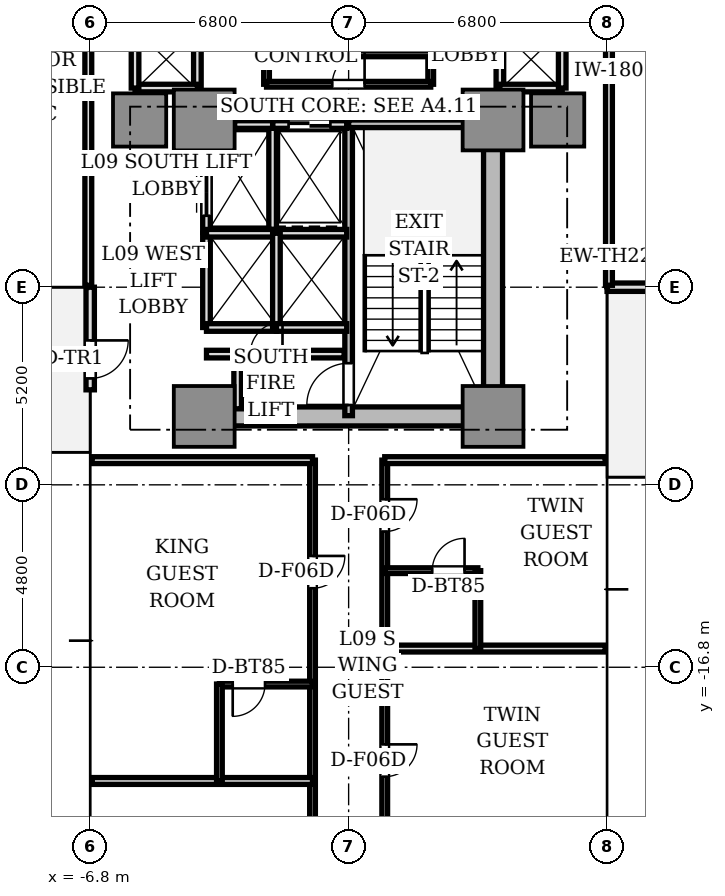
"""IFC4 building model, lengths in metres.
Left out: names, types, materials, properties, quantities, classifications, styles, units other than length and angle.
Written with IfcOpenShell. Run it as: python <this file> out.ifc"""

import sys

from ifc_helpers import new_model, si_unit, direction, frame, frame_2d, origin, origin_2d, place, context, subcontext, project, spatial, rectangle, extrude, source, transform, mapped, element, fill, save


model = new_model("IFC4")
c1 = context("Model", 3, precision=1e-05, world=origin(), true_north=direction((0.0, 1.0)))
c2 = subcontext(c1, "Body", "Model", "MODEL_VIEW")
j1 = project(units=[si_unit("LENGTHUNIT", "METRE"), si_unit("PLANEANGLEUNIT", "RADIAN")], contexts=[c1])
p1 = place(None, origin())
s1 = spatial("IfcSite", under=j1, at=p1, CompositionType="ELEMENT")
p2 = place(p1, origin())
s2 = spatial("IfcBuilding", under=s1, at=p2, CompositionType="ELEMENT")
p3 = place(p2, frame((0.0, 0.0, 36.5)))
s3 = spatial("IfcBuildingStorey", under=s2, at=p3, CompositionType="ELEMENT", Elevation=36.5)
p4 = place(p3, frame((-3.55, -10.2, 0.0), z_axis=(0.0, 0.0, 1.0), x_axis=(1.0, 0.0, 0.0)))
e1 = element("IfcWall", 1, at=p4, inside=s3, PredefinedType="SHEAR", context=c2, shape_type="SweptSolid", body=[
    extrude(rectangle(XDim=7.1, YDim=0.5, at=frame_2d((3.55, 0.0))), origin(), (0.0, 0.0, 1.0), 3.11),
])
p5 = place(p3, frame((3.8, -9.75, 0.0), z_axis=(0.0, 0.0, 1.0), x_axis=(0.0, 1.0, 0.0)))
e2 = element("IfcWall", 2, at=p5, inside=s3, PredefinedType="SHEAR", context=c2, shape_type="SweptSolid", body=[
    extrude(rectangle(XDim=6.9, YDim=0.5, at=frame_2d((3.45, 0.0))), origin(), (0.0, 0.0, 1.0), 3.11),
])
m1 = source(origin(), c2, "Body", "SweptSolid", [
    extrude(rectangle(XDim=1.6, YDim=1.6, at=origin_2d()), origin(), (0.0, 0.0, 1.0), 3.11),
])
for number, where, z_axis, x_axis in (
    (3, (-3.8, -2.4, 0.0), (0.0, 0.0, 1.0), (1.0, 0.0, 0.0)),
    (4, (3.8, -2.4, 0.0), (0.0, 0.0, 1.0), (1.0, 0.0, 0.0)),
    (5, (-3.8, -10.2, 0.0), (0.0, 0.0, 1.0), (1.0, 0.0, 0.0)),
    (6, (3.8, -10.2, 0.0), (0.0, 0.0, 1.0), (1.0, 0.0, 0.0)),
):
    element("IfcColumn", number, at=place(p3, frame(where, z_axis=z_axis, x_axis=x_axis)), inside=s3, PredefinedType="COLUMN", context=c2, shape_type="MappedRepresentation", body=[
        mapped(m1, transform((0.0, 0.0, 0.0), scale=1.0)),
    ])
m2 = source(origin(), c2, "Body", "SweptSolid", [
    extrude(rectangle(XDim=1.4, YDim=1.4, at=origin_2d()), origin(), (0.0, 0.0, 1.0), 3.11),
])
for number, where, z_axis, x_axis in (
    (7, (5.5, -2.4, 0.0), (0.0, 0.0, 1.0), (1.0, 0.0, 0.0)),
    (8, (-5.5, -2.4, 0.0), (0.0, 0.0, 1.0), (1.0, 0.0, 0.0)),
):
    element("IfcColumn", number, at=place(p3, frame(where, z_axis=z_axis, x_axis=x_axis)), inside=s3, PredefinedType="COLUMN", context=c2, shape_type="MappedRepresentation", body=[
        mapped(m2, transform((0.0, 0.0, 0.0), scale=1.0)),
    ])
p6 = place(p3, frame((6.8, -6.8, 0.0), z_axis=(0.0, 0.0, 1.0), x_axis=(1.0, 0.0, 0.0)))
e9 = element("IfcWall", 9, at=p6, inside=s3, PredefinedType="STANDARD", context=c2, shape_type="SweptSolid", body=[
    extrude(rectangle(XDim=2.7, YDim=0.22, at=frame_2d((1.35, 0.0))), origin(), (0.0, 0.0, 1.0), 3.11),
])
p7 = place(p6, frame((1.4, 0.0, 0.0)))
e10 = element("IfcOpeningElement", 10, at=p7, cuts=e9, PredefinedType="OPENING", context=c2, shape_type="SweptSolid", body=[
    extrude(rectangle(XDim=1.0, YDim=2.2, at=frame_2d((0.5, 1.1))), frame((0.0, 0.12, 0.0), z_axis=(0.0, -1.0, 0.0), x_axis=(1.0, 0.0, 0.0)), (0.0, 0.0, 1.0), 0.24),
])
p8 = place(p3, frame((-6.8, -6.8, 0.0), z_axis=(0.0, 0.0, 1.0), x_axis=(0.0, -1.0, 0.0)))
e11 = element("IfcWall", 11, at=p8, inside=s3, PredefinedType="STANDARD", context=c2, shape_type="SweptSolid", body=[
    extrude(rectangle(XDim=2.7, YDim=0.22, at=frame_2d((1.35, 0.0))), origin(), (0.0, 0.0, 1.0), 3.11),
])
p9 = place(p8, frame((1.4, 0.0, 0.0)))
e12 = element("IfcOpeningElement", 12, at=p9, cuts=e11, PredefinedType="OPENING", context=c2, shape_type="SweptSolid", body=[
    extrude(rectangle(XDim=1.0, YDim=2.2, at=frame_2d((0.5, 1.1))), frame((0.0, 0.12, 0.0), z_axis=(0.0, -1.0, 0.0), x_axis=(1.0, 0.0, 0.0)), (0.0, 0.0, 1.0), 0.24),
])
p10 = place(p3, frame((0.0, -10.18, 0.0), z_axis=(0.0, 0.0, 1.0), x_axis=(0.0, 1.0, 0.0)))
e13 = element("IfcWall", 13, at=p10, inside=s3, PredefinedType="SOLIDWALL", context=c2, shape_type="SweptSolid", body=[
    extrude(rectangle(XDim=7.68, YDim=0.2, at=frame_2d((3.84, 0.0))), origin(), (0.0, 0.0, 1.0), 3.11),
])
p11 = place(p10, frame((0.28, 0.0, 0.0)))
e14 = element("IfcOpeningElement", 14, at=p11, cuts=e13, PredefinedType="OPENING", context=c2, shape_type="SweptSolid", body=[
    extrude(rectangle(XDim=1.1, YDim=2.15, at=frame_2d((0.55, 1.075))), frame((0.0, 0.11, 0.0), z_axis=(0.0, -1.0, 0.0), x_axis=(1.0, 0.0, 0.0)), (0.0, 0.0, 1.0), 0.22),
])
p12 = place(p3, frame((0.0, -2.5, 0.0), z_axis=(0.0, 0.0, 1.0), x_axis=(1.0, 0.0, 0.0)))
e15 = element("IfcWall", 15, at=p12, inside=s3, PredefinedType="SOLIDWALL", context=c2, shape_type="SweptSolid", body=[
    extrude(rectangle(XDim=3.72, YDim=0.2, at=frame_2d((1.86, 0.0))), origin(), (0.0, 0.0, 1.0), 3.11),
])
p13 = place(p3, frame((-2.0, -5.28, 0.0), z_axis=(0.0, 0.0, 1.0), x_axis=(0.0, 1.0, 0.0)))
e16 = element("IfcWall", 16, at=p13, inside=s3, PredefinedType="SOLIDWALL", context=c2, shape_type="SweptSolid", body=[
    extrude(rectangle(XDim=2.78, YDim=0.2, at=frame_2d((1.39, 0.0))), origin(), (0.0, 0.0, 1.0), 2.66),
])
p14 = place(p3, frame((-2.0, -2.52, 0.0), z_axis=(0.0, 0.0, 1.0), x_axis=(1.0, 0.0, 0.0)))
e17 = element("IfcWall", 17, at=p14, inside=s3, PredefinedType="SOLIDWALL", context=c2, shape_type="SweptSolid", body=[
    extrude(rectangle(XDim=1.95, YDim=0.2, at=frame_2d((0.975, 0.0))), origin(), (0.0, 0.0, 1.0), 2.66),
])
p15 = place(p14, frame((0.42, 0.0, 0.0)))
e18 = element("IfcOpeningElement", 18, at=p15, cuts=e17, PredefinedType="OPENING", context=c2, shape_type="SweptSolid", body=[
    extrude(rectangle(XDim=1.1, YDim=2.2, at=frame_2d((0.55, 1.1))), frame((0.0, 0.11, 0.0), z_axis=(0.0, -1.0, 0.0), x_axis=(1.0, 0.0, 0.0)), (0.0, 0.0, 1.0), 0.22),
])
p16 = place(p3, frame((-3.0, -2.52, 0.0), z_axis=(0.0, 0.0, 1.0), x_axis=(1.0, 0.0, 0.0)))
e19 = element("IfcWall", 19, at=p16, inside=s3, PredefinedType="SOLIDWALL", context=c2, shape_type="SweptSolid", body=[
    extrude(rectangle(XDim=1.0, YDim=0.2, at=frame_2d((0.5, 0.0))), origin(), (0.0, 0.0, 1.0), 2.66),
])
p17 = place(p3, frame((-3.74, -5.36, 0.0), z_axis=(0.0, 0.0, 1.0), x_axis=(0.0, 1.0, 0.0)))
e20 = element("IfcWall", 20, at=p17, inside=s3, PredefinedType="SOLIDWALL", context=c2, shape_type="SweptSolid", body=[
    extrude(rectangle(XDim=2.08, YDim=0.2, at=frame_2d((1.04, 0.0))), origin(), (0.0, 0.0, 1.0), 2.66),
])
p18 = place(p17, frame((0.44, 0.0, 0.0)))
e21 = element("IfcOpeningElement", 21, at=p18, cuts=e20, PredefinedType="OPENING", context=c2, shape_type="SweptSolid", body=[
    extrude(rectangle(XDim=1.2, YDim=2.2, at=frame_2d((0.6, 1.1))), frame((0.0, 0.11, 0.0), z_axis=(0.0, -1.0, 0.0), x_axis=(1.0, 0.0, 0.0)), (0.0, 0.0, 1.0), 0.22),
])
p19 = place(p3, frame((-3.74, -7.86, 0.0), z_axis=(0.0, 0.0, 1.0), x_axis=(0.0, 1.0, 0.0)))
e22 = element("IfcWall", 22, at=p19, inside=s3, PredefinedType="SOLIDWALL", context=c2, shape_type="SweptSolid", body=[
    extrude(rectangle(XDim=2.48, YDim=0.2, at=frame_2d((1.24, 0.0))), origin(), (0.0, 0.0, 1.0), 2.66),
])
p20 = place(p3, frame((-3.74, -7.86, 0.0), z_axis=(0.0, 0.0, 1.0), x_axis=(1.0, 0.0, 0.0)))
e23 = element("IfcWall", 23, at=p20, inside=s3, PredefinedType="SOLIDWALL", context=c2, shape_type="SweptSolid", body=[
    extrude(rectangle(XDim=1.84, YDim=0.2, at=frame_2d((0.92, 0.0))), origin(), (0.0, 0.0, 1.0), 2.66),
])
p21 = place(p3, frame((-3.74, -5.38, 0.0), z_axis=(0.0, 0.0, 1.0), x_axis=(1.0, 0.0, 0.0)))
e24 = element("IfcWall", 24, at=p21, inside=s3, PredefinedType="SOLIDWALL", context=c2, shape_type="SweptSolid", body=[
    extrude(rectangle(XDim=3.69, YDim=0.2, at=frame_2d((1.845, 0.0))), origin(), (0.0, 0.0, 1.0), 2.66),
])
p22 = place(p3, frame((-1.9, -7.86, 0.0), z_axis=(0.0, 0.0, 1.0), x_axis=(0.0, 1.0, 0.0)))
e25 = element("IfcWall", 25, at=p22, inside=s3, PredefinedType="SOLIDWALL", context=c2, shape_type="SweptSolid", body=[
    extrude(rectangle(XDim=2.48, YDim=0.2, at=frame_2d((1.24, 0.0))), origin(), (0.0, 0.0, 1.0), 2.66),
])
p23 = place(p3, frame((-1.9, -7.86, 0.0), z_axis=(0.0, 0.0, 1.0), x_axis=(1.0, 0.0, 0.0)))
e26 = element("IfcWall", 26, at=p23, inside=s3, PredefinedType="SOLIDWALL", context=c2, shape_type="SweptSolid", body=[
    extrude(rectangle(XDim=1.85, YDim=0.2, at=frame_2d((0.925, 0.0))), origin(), (0.0, 0.0, 1.0), 2.66),
])
p24 = place(p3, frame((3.98, -1.56, 0.0), z_axis=(0.0, 0.0, 1.0), x_axis=(0.0, 1.0, 0.0)))
e27 = element("IfcWall", 27, at=p24, inside=s3, PredefinedType="SOLIDWALL", context=c2, shape_type="SweptSolid", body=[
    extrude(rectangle(XDim=3.12, YDim=0.2, at=frame_2d((1.56, 0.0))), origin(), (0.0, 0.0, 1.0), 2.18),
])
p25 = place(p3, frame((3.98, -1.56, 0.0), z_axis=(0.0, 0.0, 1.0), x_axis=(1.0, 0.0, 0.0)))
e28 = element("IfcWall", 28, at=p25, inside=s3, PredefinedType="SOLIDWALL", context=c2, shape_type="SweptSolid", body=[
    extrude(rectangle(XDim=1.64, YDim=0.2, at=frame_2d((0.82, 0.0))), origin(), (0.0, 0.0, 1.0), 2.66),
])
p26 = place(p3, frame((5.62, -1.56, 0.0), z_axis=(0.0, 0.0, 1.0), x_axis=(0.0, 1.0, 0.0)))
e29 = element("IfcWall", 29, at=p26, inside=s3, PredefinedType="SOLIDWALL", context=c2, shape_type="SweptSolid", body=[
    extrude(rectangle(XDim=1.56, YDim=0.2, at=frame_2d((0.78, 0.0))), origin(), (0.0, 0.0, 1.0), 2.66),
])
p27 = place(p3, frame((-3.98, -1.56, 0.0), z_axis=(0.0, 0.0, 1.0), x_axis=(0.0, 1.0, 0.0)))
e30 = element("IfcWall", 30, at=p27, inside=s3, PredefinedType="SOLIDWALL", context=c2, shape_type="SweptSolid", body=[
    extrude(rectangle(XDim=3.12, YDim=0.2, at=frame_2d((1.56, 0.0))), origin(), (0.0, 0.0, 1.0), 2.18),
])
p28 = place(p3, frame((-5.62, -1.56, 0.0), z_axis=(0.0, 0.0, 1.0), x_axis=(1.0, 0.0, 0.0)))
e31 = element("IfcWall", 31, at=p28, inside=s3, PredefinedType="SOLIDWALL", context=c2, shape_type="SweptSolid", body=[
    extrude(rectangle(XDim=1.64, YDim=0.2, at=frame_2d((0.82, 0.0))), origin(), (0.0, 0.0, 1.0), 2.66),
])
p29 = place(p3, frame((-5.62, -1.56, 0.0), z_axis=(0.0, 0.0, 1.0), x_axis=(0.0, 1.0, 0.0)))
e32 = element("IfcWall", 32, at=p29, inside=s3, PredefinedType="SOLIDWALL", context=c2, shape_type="SweptSolid", body=[
    extrude(rectangle(XDim=1.56, YDim=0.2, at=frame_2d((0.78, 0.0))), origin(), (0.0, 0.0, 1.0), 2.66),
])
p30 = place(p3, frame((-3.74, -8.56, 0.0), z_axis=(0.0, 0.0, 1.0), x_axis=(1.0, 0.0, 0.0)))
e33 = element("IfcWall", 33, at=p30, inside=s3, PredefinedType="SOLIDWALL", context=c2, shape_type="SweptSolid", body=[
    extrude(rectangle(XDim=3.62, YDim=0.2, at=frame_2d((1.81, 0.0))), origin(), (0.0, 0.0, 1.0), 2.66),
])
p31 = place(p30, frame((1.15, 0.0, 0.0)))
e34 = element("IfcOpeningElement", 34, at=p31, cuts=e33, PredefinedType="OPENING", context=c2, shape_type="SweptSolid", body=[
    extrude(rectangle(XDim=0.85, YDim=2.1, at=frame_2d((0.425, 1.05))), frame((0.0, 0.11, 0.0), z_axis=(0.0, -1.0, 0.0), x_axis=(1.0, 0.0, 0.0)), (0.0, 0.0, 1.0), 0.22),
])
p32 = place(p3, frame((-2.92, -10.0, 0.0), z_axis=(0.0, 0.0, 1.0), x_axis=(0.0, 1.0, 0.0)))
e35 = element("IfcWall", 35, at=p32, inside=s3, PredefinedType="SOLIDWALL", context=c2, shape_type="SweptSolid", body=[
    extrude(rectangle(XDim=1.44, YDim=0.2, at=frame_2d((0.72, 0.0))), origin(), (0.0, 0.0, 1.0), 2.66),
])
p33 = place(p3, frame((2.16, -1.46, 0.0), z_axis=(0.0, 0.0, 1.0), x_axis=(0.0, 1.0, 0.0)))
e36 = element("IfcWall", 36, at=p33, inside=s3, PredefinedType="PARTITIONING", context=c2, shape_type="SweptSolid", body=[
    extrude(rectangle(XDim=2.92, YDim=0.15, at=frame_2d((1.46, 0.0))), origin(), (0.0, 0.0, 1.0), 2.66),
])
p34 = place(p33, frame((1.035, 0.0, 0.0)))
e37 = element("IfcOpeningElement", 37, at=p34, cuts=e36, PredefinedType="OPENING", context=c2, shape_type="SweptSolid", body=[
    extrude(rectangle(XDim=0.85, YDim=2.1, at=frame_2d((0.425, 1.05))), frame((0.0, 0.085, 0.0), z_axis=(0.0, -1.0, 0.0), x_axis=(1.0, 0.0, 0.0)), (0.0, 0.0, 1.0), 0.17),
])
p35 = place(p3, frame((-2.16, -1.46, 0.0), z_axis=(0.0, 0.0, 1.0), x_axis=(0.0, 1.0, 0.0)))
e38 = element("IfcWall", 38, at=p35, inside=s3, PredefinedType="PARTITIONING", context=c2, shape_type="SweptSolid", body=[
    extrude(rectangle(XDim=2.92, YDim=0.15, at=frame_2d((1.46, 0.0))), origin(), (0.0, 0.0, 1.0), 2.66),
])
p36 = place(p3, frame((-2.16, -1.46, 0.0), z_axis=(0.0, 0.0, 1.0), x_axis=(1.0, 0.0, 0.0)))
e39 = element("IfcWall", 39, at=p36, inside=s3, PredefinedType="PARTITIONING", context=c2, shape_type="SweptSolid", body=[
    extrude(rectangle(XDim=4.32, YDim=0.15, at=frame_2d((2.16, 0.0))), origin(), (0.0, 0.0, 1.0), 2.66),
])
p37 = place(p36, frame((1.73, 0.0, 0.0)))
e40 = element("IfcOpeningElement", 40, at=p37, cuts=e39, PredefinedType="OPENING", context=c2, shape_type="SweptSolid", body=[
    extrude(rectangle(XDim=0.85, YDim=2.1, at=frame_2d((0.425, 1.05))), frame((0.0, 0.085, 0.0), z_axis=(0.0, -1.0, 0.0), x_axis=(1.0, 0.0, 0.0)), (0.0, 0.0, 1.0), 0.17),
])
p38 = place(p3, frame((-2.16, -0.66, 0.0), z_axis=(0.0, 0.0, 1.0), x_axis=(1.0, 0.0, 0.0)))
e41 = element("IfcWall", 41, at=p38, inside=s3, PredefinedType="PARTITIONING", context=c2, shape_type="SweptSolid", body=[
    extrude(rectangle(XDim=4.32, YDim=0.15, at=frame_2d((2.16, 0.0))), origin(), (0.0, 0.0, 1.0), 2.66),
])
for number, where, z_axis, x_axis in (
    (42, (6.85, -6.75, 0.0), (0.0, 0.0, 1.0), (0.0, 1.0, 0.0)),
    (43, (-6.85, 4.55, 0.0), (0.0, 0.0, 1.0), (0.0, -1.0, 0.0)),
):
    element("IfcWall", number, at=place(p3, frame(where, z_axis=z_axis, x_axis=x_axis)), inside=s3, PredefinedType="PARTITIONING", context=c2, shape_type="SweptSolid", body=[
        extrude(rectangle(XDim=11.3, YDim=0.18, at=frame_2d((5.65, 0.0))), origin(), (0.0, 0.0, 1.0), 2.66),
    ])
p39 = place(p3, frame((0.95, -11.35, 0.0), z_axis=(0.0, 0.0, 1.0), x_axis=(0.0, -1.0, 0.0)))
e44 = element("IfcWall", 44, at=p39, inside=s3, PredefinedType="PARTITIONING", context=c2, shape_type="SweptSolid", body=[
    extrude(rectangle(XDim=13.4, YDim=0.15, at=frame_2d((6.7, 0.0))), origin(), (0.0, 0.0, 1.0), 2.66),
])
p40 = place(p39, frame((1.029, 0.0, 0.0)))
e45 = element("IfcOpeningElement", 45, at=p40, cuts=e44, PredefinedType="OPENING", context=c2, shape_type="SweptSolid", body=[
    extrude(rectangle(XDim=0.85, YDim=2.1, at=frame_2d((0.425, 1.05))), frame((0.0, 0.085, 0.0), z_axis=(0.0, -1.0, 0.0), x_axis=(1.0, 0.0, 0.0)), (0.0, 0.0, 1.0), 0.17),
])
p41 = place(p39, frame((7.479, 0.0, 0.0)))
e46 = element("IfcOpeningElement", 46, at=p41, cuts=e44, PredefinedType="OPENING", context=c2, shape_type="SweptSolid", body=[
    extrude(rectangle(XDim=0.85, YDim=2.1, at=frame_2d((0.425, 1.05))), frame((0.0, 0.085, 0.0), z_axis=(0.0, -1.0, 0.0), x_axis=(1.0, 0.0, 0.0)), (0.0, 0.0, 1.0), 0.17),
])
p42 = place(p3, frame((-0.95, -11.35, 0.0), z_axis=(0.0, 0.0, 1.0), x_axis=(0.0, -1.0, 0.0)))
e47 = element("IfcWall", 47, at=p42, inside=s3, PredefinedType="PARTITIONING", context=c2, shape_type="SweptSolid", body=[
    extrude(rectangle(XDim=13.4, YDim=0.15, at=frame_2d((6.7, 0.0))), origin(), (0.0, 0.0, 1.0), 2.66),
])
p43 = place(p42, frame((2.521, 0.0, 0.0)))
e48 = element("IfcOpeningElement", 48, at=p43, cuts=e47, PredefinedType="OPENING", context=c2, shape_type="SweptSolid", body=[
    extrude(rectangle(XDim=0.85, YDim=2.1, at=frame_2d((0.425, 1.05))), frame((0.0, 0.085, 0.0), z_axis=(0.0, -1.0, 0.0), x_axis=(1.0, 0.0, 0.0)), (0.0, 0.0, 1.0), 0.17),
])
p44 = place(p42, frame((9.471, 0.0, 0.0)))
e49 = element("IfcOpeningElement", 49, at=p44, cuts=e47, PredefinedType="OPENING", context=c2, shape_type="SweptSolid", body=[
    extrude(rectangle(XDim=0.85, YDim=2.1, at=frame_2d((0.425, 1.05))), frame((0.0, 0.085, 0.0), z_axis=(0.0, -1.0, 0.0), x_axis=(1.0, 0.0, 0.0)), (0.0, 0.0, 1.0), 0.17),
])
for number, where, z_axis, x_axis in (
    (50, (0.95, -11.35, 0.0), (0.0, 0.0, 1.0), (1.0, 0.0, 0.0)),
    (51, (-6.75, -11.35, 0.0), (0.0, 0.0, 1.0), (1.0, 0.0, 0.0)),
    (52, (0.95, -16.308, 0.0), (0.0, 0.0, 1.0), (1.0, 0.0, 0.0)),
):
    element("IfcWall", number, at=place(p3, frame(where, z_axis=z_axis, x_axis=x_axis)), inside=s3, PredefinedType="PARTITIONING", context=c2, shape_type="SweptSolid", body=[
        extrude(rectangle(XDim=5.8, YDim=0.18, at=frame_2d((2.9, 0.0))), origin(), (0.0, 0.0, 1.0), 2.66),
    ])
p45 = place(p3, frame((0.95, -14.258, 0.0), z_axis=(0.0, 0.0, 1.0), x_axis=(1.0, 0.0, 0.0)))
e53 = element("IfcWall", 53, at=p45, inside=s3, PredefinedType="PARTITIONING", context=c2, shape_type="SweptSolid", body=[
    extrude(rectangle(XDim=2.45, YDim=0.15, at=frame_2d((1.225, 0.0))), origin(), (0.0, 0.0, 1.0), 2.66),
])
p46 = place(p45, frame((1.25, 0.0, 0.0)))
e54 = element("IfcOpeningElement", 54, at=p46, cuts=e53, PredefinedType="OPENING", context=c2, shape_type="SweptSolid", body=[
    extrude(rectangle(XDim=0.85, YDim=2.1, at=frame_2d((0.425, 1.05))), frame((0.0, 0.085, 0.0), z_axis=(0.0, -1.0, 0.0), x_axis=(1.0, 0.0, 0.0)), (0.0, 0.0, 1.0), 0.17),
])
p47 = place(p3, frame((3.4, -14.258, 0.0), z_axis=(0.0, 0.0, 1.0), x_axis=(0.0, -1.0, 0.0)))
e55 = element("IfcWall", 55, at=p47, inside=s3, PredefinedType="PARTITIONING", context=c2, shape_type="SweptSolid", body=[
    extrude(rectangle(XDim=2.05, YDim=0.15, at=frame_2d((1.025, 0.0))), origin(), (0.0, 0.0, 1.0), 2.66),
])
p48 = place(p3, frame((-0.95, -19.792, 0.0), z_axis=(0.0, 0.0, 1.0), x_axis=(-1.0, 0.0, 0.0)))
e56 = element("IfcWall", 56, at=p48, inside=s3, PredefinedType="PARTITIONING", context=c2, shape_type="SweptSolid", body=[
    extrude(rectangle(XDim=5.8, YDim=0.18, at=frame_2d((2.9, 0.0))), origin(), (0.0, 0.0, 1.0), 2.66),
])
p49 = place(p3, frame((-0.95, -17.242, 0.0), z_axis=(0.0, 0.0, 1.0), x_axis=(-1.0, 0.0, 0.0)))
e57 = element("IfcWall", 57, at=p49, inside=s3, PredefinedType="PARTITIONING", context=c2, shape_type="SweptSolid", body=[
    extrude(rectangle(XDim=2.45, YDim=0.15, at=frame_2d((1.225, 0.0))), origin(), (0.0, 0.0, 1.0), 2.66),
])
p50 = place(p49, frame((1.25, 0.0, 0.0)))
e58 = element("IfcOpeningElement", 58, at=p50, cuts=e57, PredefinedType="OPENING", context=c2, shape_type="SweptSolid", body=[
    extrude(rectangle(XDim=0.85, YDim=2.1, at=frame_2d((0.425, 1.05))), frame((0.0, 0.085, 0.0), z_axis=(0.0, -1.0, 0.0), x_axis=(1.0, 0.0, 0.0)), (0.0, 0.0, 1.0), 0.17),
])
p51 = place(p3, frame((-3.4, -17.242, 0.0), z_axis=(0.0, 0.0, 1.0), x_axis=(0.0, -1.0, 0.0)))
e59 = element("IfcWall", 59, at=p51, inside=s3, PredefinedType="PARTITIONING", context=c2, shape_type="SweptSolid", body=[
    extrude(rectangle(XDim=2.55, YDim=0.15, at=frame_2d((1.275, 0.0))), origin(), (0.0, 0.0, 1.0), 2.66),
])
m3 = source(origin(), c2, "Body", "SweptSolid", [
    extrude(rectangle(XDim=1.0, YDim=0.05, at=origin_2d()), origin(), (0.0, 0.0, 1.0), 2.2),
])
p52 = place(p9, frame((0.5, 0.0, 0.0)))
e60 = element("IfcDoor", 60, at=p52, inside=s3, OperationType="SINGLE_SWING_LEFT", PredefinedType="DOOR", context=c2, shape_type="MappedRepresentation", body=[
    mapped(m3, transform((0.0, 0.0, 0.0), scale=1.0)),
])
fill(e12, e60)
m4 = source(origin(), c2, "Body", "SweptSolid", [
    extrude(rectangle(XDim=1.1, YDim=0.05, at=origin_2d()), origin(), (0.0, 0.0, 1.0), 2.2),
])
p53 = place(p15, frame((0.55, 0.0, 0.0)))
e61 = element("IfcDoor", 61, at=p53, inside=s3, OperationType="DOUBLE_DOOR_SLIDING", PredefinedType="DOOR", context=c2, shape_type="MappedRepresentation", body=[
    mapped(m4, transform((0.0, 0.0, 0.0), scale=1.0)),
])
fill(e18, e61)
m5 = source(origin(), c2, "Body", "SweptSolid", [
    extrude(rectangle(XDim=1.2, YDim=0.05, at=origin_2d()), origin(), (0.0, 0.0, 1.0), 2.2),
])
p54 = place(p18, frame((0.6, 0.0, 0.0)))
e62 = element("IfcDoor", 62, at=p54, inside=s3, OperationType="DOUBLE_DOOR_SLIDING", PredefinedType="DOOR", context=c2, shape_type="MappedRepresentation", body=[
    mapped(m5, transform((0.0, 0.0, 0.0), scale=1.0)),
])
fill(e21, e62)
m6 = source(origin(), c2, "Body", "SweptSolid", [
    extrude(rectangle(XDim=1.1, YDim=0.05, at=origin_2d()), origin(), (0.0, 0.0, 1.0), 2.15),
])
p55 = place(p11, frame((0.55, 0.0, 0.0)))
e63 = element("IfcDoor", 63, at=p55, inside=s3, OperationType="SINGLE_SWING_LEFT", PredefinedType="DOOR", context=c2, shape_type="MappedRepresentation", body=[
    mapped(m6, transform((0.0, 0.0, 0.0), scale=1.0)),
])
fill(e14, e63)
m7 = source(origin(), c2, "Body", "SweptSolid", [
    extrude(rectangle(XDim=0.85, YDim=0.05, at=origin_2d()), origin(), (0.0, 0.0, 1.0), 2.1),
])
p56 = place(p31, frame((0.425, 0.0, 0.0)))
e64 = element("IfcDoor", 64, at=p56, inside=s3, OperationType="SINGLE_SWING_RIGHT", PredefinedType="DOOR", context=c2, shape_type="MappedRepresentation", body=[
    mapped(m7, transform((0.0, 0.0, 0.0), scale=1.0)),
])
fill(e34, e64)
p57 = place(p37, frame((0.425, 0.0, 0.0)))
e65 = element("IfcDoor", 65, at=p57, inside=s3, OperationType="SINGLE_SWING_RIGHT", PredefinedType="DOOR", context=c2, shape_type="MappedRepresentation", body=[
    mapped(m7, transform((0.0, 0.0, 0.0), scale=1.0)),
])
fill(e40, e65)
p58 = place(p46, frame((0.425, 0.0, 0.0)))
e66 = element("IfcDoor", 66, at=p58, inside=s3, OperationType="SINGLE_SWING_RIGHT", PredefinedType="DOOR", context=c2, shape_type="MappedRepresentation", body=[
    mapped(m7, transform((0.0, 0.0, 0.0), scale=1.0)),
])
fill(e54, e66)
p59 = place(p40, frame((0.425, 0.0, 0.0)))
e67 = element("IfcDoor", 67, at=p59, inside=s3, OperationType="SINGLE_SWING_LEFT", PredefinedType="DOOR", context=c2, shape_type="MappedRepresentation", body=[
    mapped(m7, transform((0.0, 0.0, 0.0), scale=1.0)),
])
fill(e45, e67)
p60 = place(p41, frame((0.425, 0.0, 0.0)))
e68 = element("IfcDoor", 68, at=p60, inside=s3, OperationType="SINGLE_SWING_LEFT", PredefinedType="DOOR", context=c2, shape_type="MappedRepresentation", body=[
    mapped(m7, transform((0.0, 0.0, 0.0), scale=1.0)),
])
fill(e46, e68)
p61 = place(p50, frame((0.425, 0.0, 0.0)))
e69 = element("IfcDoor", 69, at=p61, inside=s3, OperationType="SINGLE_SWING_RIGHT", PredefinedType="DOOR", context=c2, shape_type="MappedRepresentation", body=[
    mapped(m7, transform((0.0, 0.0, 0.0), scale=1.0)),
])
fill(e58, e69)
p62 = place(p43, frame((0.425, 0.0, 0.0)))
e70 = element("IfcDoor", 70, at=p62, inside=s3, OperationType="SINGLE_SWING_LEFT", PredefinedType="DOOR", context=c2, shape_type="MappedRepresentation", body=[
    mapped(m7, transform((0.0, 0.0, 0.0), scale=1.0)),
])
fill(e48, e70)
save(model, sys.argv[1])
